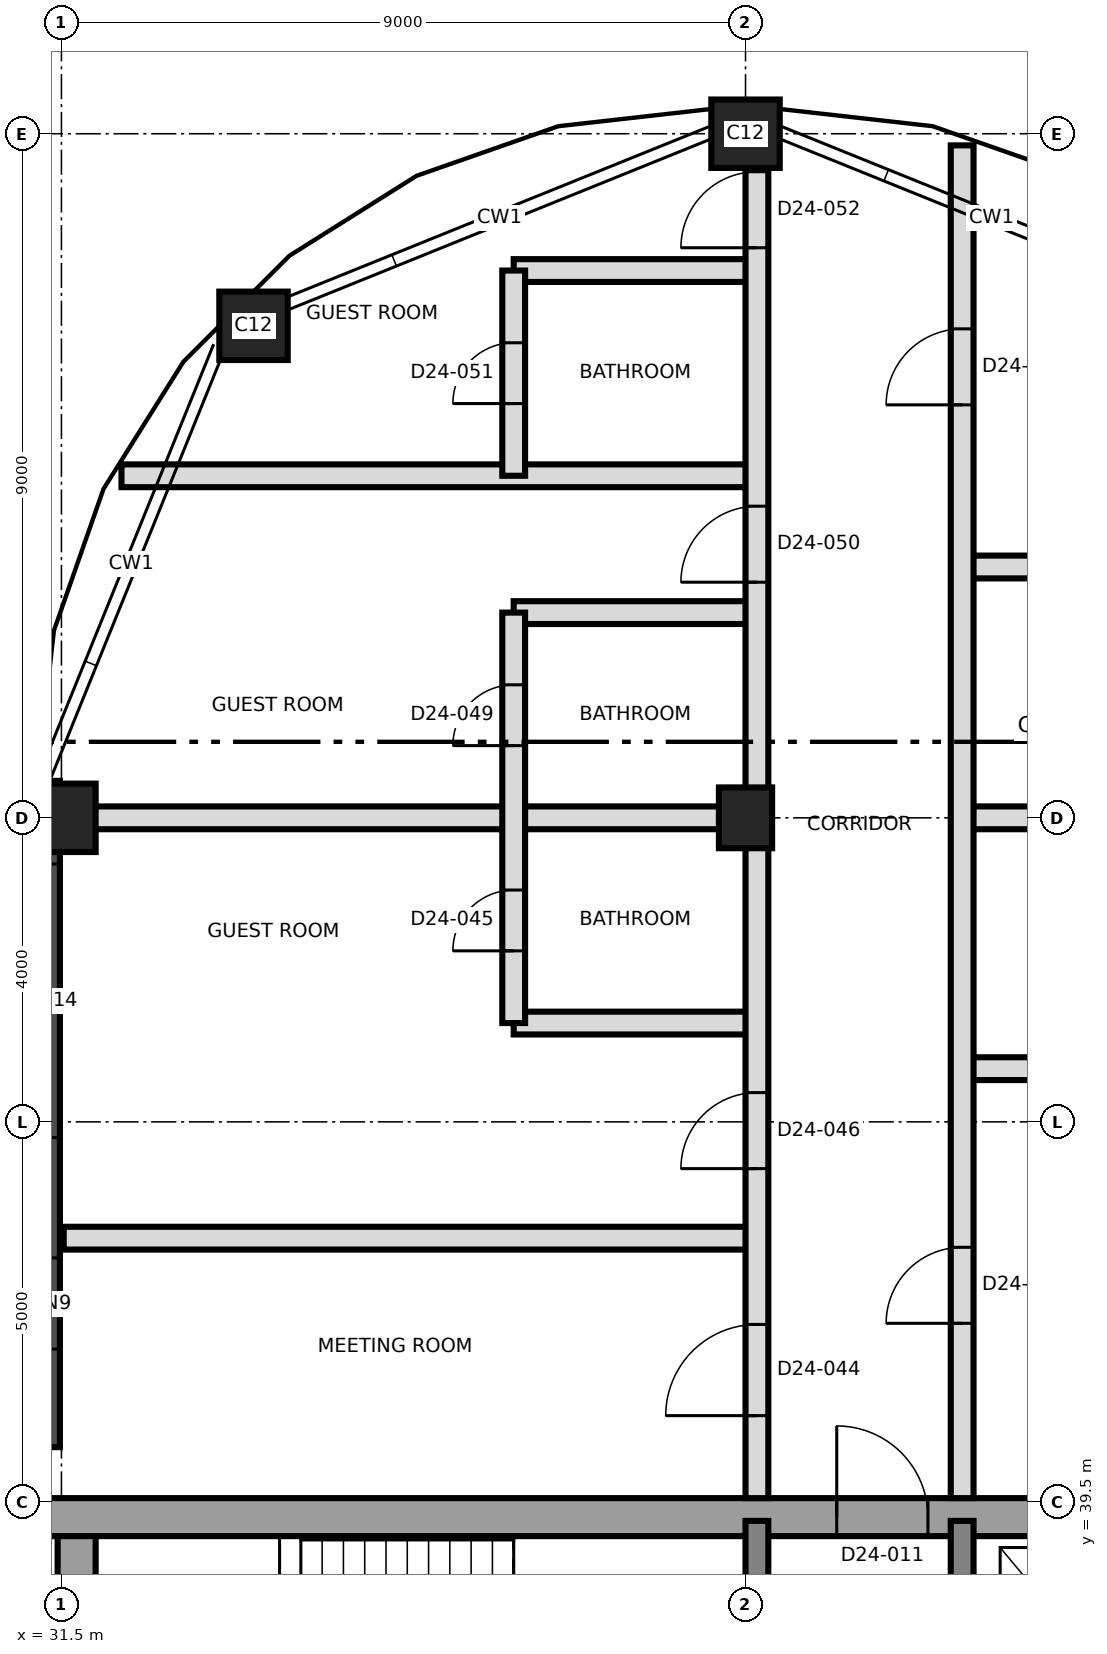
"""IFC4 building model, lengths in metres.
Left out: names, types, materials, properties, quantities, classifications, styles, units other than length and angle.
Written with IfcOpenShell. Run it as: python <this file> out.ifc"""

import sys

from ifc_helpers import new_model, si_unit, direction, frame, frame_2d, origin, origin_2d, place, context, subcontext, project, spatial, rectangle, extrude, element, fill, save


model = new_model("IFC4")
c1 = context("Model", 3, precision=1e-05, world=origin(), true_north=direction((0.0, 1.0)))
c2 = subcontext(c1, "Body", "Model", "MODEL_VIEW")
j1 = project(units=[si_unit("LENGTHUNIT", "METRE"), si_unit("PLANEANGLEUNIT", "RADIAN")], contexts=[c1])
p1 = place(None, origin())
s1 = spatial("IfcSite", under=j1, at=p1, CompositionType="ELEMENT")
p2 = place(p1, origin())
s2 = spatial("IfcBuilding", under=s1, at=p2, CompositionType="ELEMENT")
p3 = place(p2, frame((0.0, 0.0, 221.7)))
s3 = spatial("IfcBuildingStorey", under=s2, at=p3, CompositionType="ELEMENT", Elevation=221.7)
p4 = place(p3, frame((31.7, 21.75, 0.0), z_axis=(0.0, 0.0, 1.0), x_axis=(0.0, 1.0, 0.0)))
e1 = element("IfcWall", 1, at=p4, inside=s3, PredefinedType="SHEAR", context=c2, shape_type="SweptSolid", body=[
    extrude(rectangle(XDim=17.5, YDim=0.5, at=frame_2d((8.75, 0.0))), origin(), (0.0, 0.0, 1.0), 3.7),
])
p5 = place(p3, frame((31.25, 39.3, 0.0), z_axis=(0.0, 0.0, 1.0), x_axis=(1.0, 0.0, 0.0)))
e2 = element("IfcWall", 2, at=p5, inside=s3, PredefinedType="SHEAR", context=c2, shape_type="SweptSolid", body=[
    extrude(rectangle(XDim=27.0, YDim=0.5, at=frame_2d((13.5, 0.0))), origin(), (0.0, 0.0, 1.0), 3.7),
])
p6 = place(p5, frame((10.45, 0.0, 0.0)))
e3 = element("IfcOpeningElement", 3, at=p6, cuts=e2, PredefinedType="OPENING", context=c2, shape_type="SweptSolid", body=[
    extrude(rectangle(XDim=1.2, YDim=2.1, at=frame_2d((0.6, 1.05))), frame((0.0, 0.26, 0.0), z_axis=(0.0, -1.0, 0.0), x_axis=(1.0, 0.0, 0.0)), (0.0, 0.0, 1.0), 0.52),
])
for number, where, z_axis, x_axis in (
    (4, (40.65, 33.5, 0.0), (0.0, 0.0, 1.0), (0.0, 1.0, 0.0)),
    (5, (43.35, 33.5, 0.0), (0.0, 0.0, 1.0), (0.0, 1.0, 0.0)),
):
    element("IfcWall", number, at=place(p3, frame(where, z_axis=z_axis, x_axis=x_axis)), inside=s3, PredefinedType="SHEAR", context=c2, shape_type="SweptSolid", body=[
        extrude(rectangle(XDim=5.75, YDim=0.3, at=frame_2d((2.875, 0.0))), origin(), (0.0, 0.0, 1.0), 3.7),
    ])
p7 = place(p3, frame((31.5, 48.5, 0.0), z_axis=(0.0, 0.0, 1.0), x_axis=(1.0, 0.0, 0.0)))
e6 = element("IfcColumn", 6, at=p7, inside=s3, PredefinedType="COLUMN", context=c2, shape_type="SweptSolid", body=[
    extrude(rectangle(XDim=0.9, YDim=0.9, at=origin_2d()), origin(), (0.0, 0.0, 1.0), 3.7),
])
p8 = place(p3, frame((40.5, 48.5, 0.0), z_axis=(0.0, 0.0, 1.0), x_axis=(0.0, 1.0, 0.0)))
e7 = element("IfcColumn", 7, at=p8, inside=s3, PredefinedType="COLUMN", context=c2, shape_type="SweptSolid", body=[
    extrude(rectangle(XDim=0.8, YDim=0.7, at=origin_2d()), origin(), (0.0, 0.0, 1.0), 3.7),
])
for number, where, z_axis, x_axis in (
    (8, (34.027, 54.973, 0.0), (0.0, 0.0, 1.0), (1.0, 0.0, 0.0)),
    (9, (40.5, 57.5, 0.0), (0.0, 0.0, 1.0), (1.0, 0.0, 0.0)),
):
    element("IfcColumn", number, at=place(p3, frame(where, z_axis=z_axis, x_axis=x_axis)), inside=s3, PredefinedType="COLUMN", context=c2, shape_type="SweptSolid", body=[
        extrude(rectangle(XDim=0.9, YDim=0.9, at=origin_2d()), origin(), (0.0, 0.0, 1.0), 3.7),
    ])
p9 = place(p3, frame((31.33, 48.986, 0.0), z_axis=(0.0, 0.0, 1.0), x_axis=(0.0, -1.0, 0.0)))
e10 = element("IfcWall", 10, at=p9, inside=s3, PredefinedType="SOLIDWALL", context=c2, shape_type="SweptSolid", body=[
    extrude(rectangle(XDim=8.766, YDim=0.3, at=frame_2d((4.383, 0.0))), origin(), (0.0, 0.0, 1.0), 3.4),
])
p10 = place(p9, frame((1.093, 0.0, 0.9)))
e11 = element("IfcOpeningElement", 11, at=p10, cuts=e10, PredefinedType="OPENING", context=c2, shape_type="SweptSolid", body=[
    extrude(rectangle(XDim=3.6, YDim=1.7, at=frame_2d((1.8, 0.85))), frame((0.0, 0.16, 0.0), z_axis=(0.0, -1.0, 0.0), x_axis=(1.0, 0.0, 0.0)), (0.0, 0.0, 1.0), 0.32),
])
p11 = place(p9, frame((6.276, 0.0, 0.9)))
e12 = element("IfcOpeningElement", 12, at=p11, cuts=e10, PredefinedType="OPENING", context=c2, shape_type="SweptSolid", body=[
    extrude(rectangle(XDim=1.2, YDim=1.5, at=frame_2d((0.6, 0.75))), frame((0.0, 0.16, 0.0), z_axis=(0.0, -1.0, 0.0), x_axis=(1.0, 0.0, 0.0)), (0.0, 0.0, 1.0), 0.32),
])
p12 = place(p3, frame((31.53, 42.97, 0.0), z_axis=(0.0, 0.0, 1.0), x_axis=(1.0, 0.0, 0.0)))
e13 = element("IfcWall", 13, at=p12, inside=s3, PredefinedType="PARTITIONING", context=c2, shape_type="SweptSolid", body=[
    extrude(rectangle(XDim=9.12, YDim=0.3, at=frame_2d((4.56, 0.0))), origin(), (0.0, 0.0, 1.0), 3.4),
])
p13 = place(p3, frame((43.35, 45.2, 0.0), z_axis=(0.0, 0.0, 1.0), x_axis=(1.0, 0.0, 0.0)))
e14 = element("IfcWall", 14, at=p13, inside=s3, PredefinedType="PARTITIONING", context=c2, shape_type="SweptSolid", body=[
    extrude(rectangle(XDim=3.5, YDim=0.3, at=frame_2d((1.75, 0.0))), origin(), (0.0, 0.0, 1.0), 3.4),
])
p14 = place(p3, frame((37.45, 45.8, 0.0), z_axis=(0.0, 0.0, 1.0), x_axis=(1.0, 0.0, 0.0)))
e15 = element("IfcWall", 15, at=p14, inside=s3, PredefinedType="PARTITIONING", context=c2, shape_type="SweptSolid", body=[
    extrude(rectangle(XDim=3.2, YDim=0.3, at=frame_2d((1.6, 0.0))), origin(), (0.0, 0.0, 1.0), 3.4),
])
p15 = place(p3, frame((31.53, 48.5, 0.0), z_axis=(0.0, 0.0, 1.0), x_axis=(1.0, 0.0, 0.0)))
e16 = element("IfcWall", 16, at=p15, inside=s3, PredefinedType="PARTITIONING", context=c2, shape_type="SweptSolid", body=[
    extrude(rectangle(XDim=9.12, YDim=0.3, at=frame_2d((4.56, 0.0))), origin(), (0.0, 0.0, 1.0), 3.4),
])
p16 = place(p3, frame((43.35, 48.5, 0.0), z_axis=(0.0, 0.0, 1.0), x_axis=(1.0, 0.0, 0.0)))
e17 = element("IfcWall", 17, at=p16, inside=s3, PredefinedType="PARTITIONING", context=c2, shape_type="SweptSolid", body=[
    extrude(rectangle(XDim=6.12, YDim=0.3, at=frame_2d((3.06, 0.0))), origin(), (0.0, 0.0, 1.0), 3.4),
])
p17 = place(p3, frame((37.45, 51.2, 0.0), z_axis=(0.0, 0.0, 1.0), x_axis=(1.0, 0.0, 0.0)))
e18 = element("IfcWall", 18, at=p17, inside=s3, PredefinedType="PARTITIONING", context=c2, shape_type="SweptSolid", body=[
    extrude(rectangle(XDim=3.2, YDim=0.3, at=frame_2d((1.6, 0.0))), origin(), (0.0, 0.0, 1.0), 3.4),
])
p18 = place(p3, frame((43.35, 51.8, 0.0), z_axis=(0.0, 0.0, 1.0), x_axis=(1.0, 0.0, 0.0)))
e19 = element("IfcWall", 19, at=p18, inside=s3, PredefinedType="PARTITIONING", context=c2, shape_type="SweptSolid", body=[
    extrude(rectangle(XDim=3.5, YDim=0.3, at=frame_2d((1.75, 0.0))), origin(), (0.0, 0.0, 1.0), 3.4),
])
p19 = place(p3, frame((32.29, 53.0, 0.0), z_axis=(0.0, 0.0, 1.0), x_axis=(1.0, 0.0, 0.0)))
e20 = element("IfcWall", 20, at=p19, inside=s3, PredefinedType="PARTITIONING", context=c2, shape_type="SweptSolid", body=[
    extrude(rectangle(XDim=8.36, YDim=0.3, at=frame_2d((4.18, 0.0))), origin(), (0.0, 0.0, 1.0), 3.4),
])
p20 = place(p3, frame((37.45, 55.7, 0.0), z_axis=(0.0, 0.0, 1.0), x_axis=(1.0, 0.0, 0.0)))
e21 = element("IfcWall", 21, at=p20, inside=s3, PredefinedType="PARTITIONING", context=c2, shape_type="SweptSolid", body=[
    extrude(rectangle(XDim=3.2, YDim=0.3, at=frame_2d((1.6, 0.0))), origin(), (0.0, 0.0, 1.0), 3.4),
])
p21 = place(p3, frame((37.45, 45.8, 0.0), z_axis=(0.0, 0.0, 1.0), x_axis=(0.0, 1.0, 0.0)))
e22 = element("IfcWall", 22, at=p21, inside=s3, PredefinedType="PARTITIONING", context=c2, shape_type="SweptSolid", body=[
    extrude(rectangle(XDim=5.4, YDim=0.3, at=frame_2d((2.7, 0.0))), origin(), (0.0, 0.0, 1.0), 3.4),
])
p22 = place(p21, frame((0.95, 0.0, 0.0)))
e23 = element("IfcOpeningElement", 23, at=p22, cuts=e22, PredefinedType="OPENING", context=c2, shape_type="SweptSolid", body=[
    extrude(rectangle(XDim=0.8, YDim=2.1, at=frame_2d((0.4, 1.05))), frame((0.0, 0.16, 0.0), z_axis=(0.0, -1.0, 0.0), x_axis=(1.0, 0.0, 0.0)), (0.0, 0.0, 1.0), 0.32),
])
p23 = place(p21, frame((3.65, 0.0, 0.0)))
e24 = element("IfcOpeningElement", 24, at=p23, cuts=e22, PredefinedType="OPENING", context=c2, shape_type="SweptSolid", body=[
    extrude(rectangle(XDim=0.8, YDim=2.1, at=frame_2d((0.4, 1.05))), frame((0.0, 0.16, 0.0), z_axis=(0.0, -1.0, 0.0), x_axis=(1.0, 0.0, 0.0)), (0.0, 0.0, 1.0), 0.32),
])
p24 = place(p3, frame((37.45, 53.0, 0.0), z_axis=(0.0, 0.0, 1.0), x_axis=(0.0, 1.0, 0.0)))
e25 = element("IfcWall", 25, at=p24, inside=s3, PredefinedType="PARTITIONING", context=c2, shape_type="SweptSolid", body=[
    extrude(rectangle(XDim=2.7, YDim=0.3, at=frame_2d((1.35, 0.0))), origin(), (0.0, 0.0, 1.0), 3.4),
])
p25 = place(p24, frame((0.95, 0.0, 0.0)))
e26 = element("IfcOpeningElement", 26, at=p25, cuts=e25, PredefinedType="OPENING", context=c2, shape_type="SweptSolid", body=[
    extrude(rectangle(XDim=0.8, YDim=2.1, at=frame_2d((0.4, 1.05))), frame((0.0, 0.16, 0.0), z_axis=(0.0, -1.0, 0.0), x_axis=(1.0, 0.0, 0.0)), (0.0, 0.0, 1.0), 0.32),
])
p26 = place(p3, frame((40.65, 39.55, 0.0), z_axis=(0.0, 0.0, 1.0), x_axis=(0.0, 1.0, 0.0)))
e27 = element("IfcWall", 27, at=p26, inside=s3, PredefinedType="PARTITIONING", context=c2, shape_type="SweptSolid", body=[
    extrude(rectangle(XDim=17.92, YDim=0.3, at=frame_2d((8.96, 0.0))), origin(), (0.0, 0.0, 1.0), 3.4),
])
p27 = place(p26, frame((1.085, 0.0, 0.0)))
e28 = element("IfcOpeningElement", 28, at=p27, cuts=e27, PredefinedType="OPENING", context=c2, shape_type="SweptSolid", body=[
    extrude(rectangle(XDim=1.2, YDim=2.1, at=frame_2d((0.6, 1.05))), frame((0.0, 0.16, 0.0), z_axis=(0.0, -1.0, 0.0), x_axis=(1.0, 0.0, 0.0)), (0.0, 0.0, 1.0), 0.32),
])
p28 = place(p26, frame((4.335, 0.0, 0.0)))
e29 = element("IfcOpeningElement", 29, at=p28, cuts=e27, PredefinedType="OPENING", context=c2, shape_type="SweptSolid", body=[
    extrude(rectangle(XDim=1.0, YDim=2.1, at=frame_2d((0.5, 1.05))), frame((0.0, 0.16, 0.0), z_axis=(0.0, -1.0, 0.0), x_axis=(1.0, 0.0, 0.0)), (0.0, 0.0, 1.0), 0.32),
])
p29 = place(p26, frame((12.05, 0.0, 0.0)))
e30 = element("IfcOpeningElement", 30, at=p29, cuts=e27, PredefinedType="OPENING", context=c2, shape_type="SweptSolid", body=[
    extrude(rectangle(XDim=1.0, YDim=2.1, at=frame_2d((0.5, 1.05))), frame((0.0, 0.16, 0.0), z_axis=(0.0, -1.0, 0.0), x_axis=(1.0, 0.0, 0.0)), (0.0, 0.0, 1.0), 0.32),
])
p30 = place(p26, frame((16.45, 0.0, 0.0)))
e31 = element("IfcOpeningElement", 31, at=p30, cuts=e27, PredefinedType="OPENING", context=c2, shape_type="SweptSolid", body=[
    extrude(rectangle(XDim=1.0, YDim=2.1, at=frame_2d((0.5, 1.05))), frame((0.0, 0.16, 0.0), z_axis=(0.0, -1.0, 0.0), x_axis=(1.0, 0.0, 0.0)), (0.0, 0.0, 1.0), 0.32),
])
p31 = place(p3, frame((43.35, 39.55, 0.0), z_axis=(0.0, 0.0, 1.0), x_axis=(0.0, 1.0, 0.0)))
e32 = element("IfcWall", 32, at=p31, inside=s3, PredefinedType="PARTITIONING", context=c2, shape_type="SweptSolid", body=[
    extrude(rectangle(XDim=17.797, YDim=0.3, at=frame_2d((8.898, 0.0))), origin(), (0.0, 0.0, 1.0), 3.4),
])
p32 = place(p31, frame((2.3, 0.0, 0.0)))
e33 = element("IfcOpeningElement", 33, at=p32, cuts=e32, PredefinedType="OPENING", context=c2, shape_type="SweptSolid", body=[
    extrude(rectangle(XDim=1.0, YDim=2.4, at=frame_2d((0.5, 1.2))), frame((0.0, 0.16, 0.0), z_axis=(0.0, -1.0, 0.0), x_axis=(1.0, 0.0, 0.0)), (0.0, 0.0, 1.0), 0.32),
])
p33 = place(p31, frame((14.383, 0.0, 0.0)))
e34 = element("IfcOpeningElement", 34, at=p33, cuts=e32, PredefinedType="OPENING", context=c2, shape_type="SweptSolid", body=[
    extrude(rectangle(XDim=1.0, YDim=2.4, at=frame_2d((0.5, 1.2))), frame((0.0, 0.16, 0.0), z_axis=(0.0, -1.0, 0.0), x_axis=(1.0, 0.0, 0.0)), (0.0, 0.0, 1.0), 0.32),
])
p34 = place(p6, origin())
e35 = element("IfcDoor", 35, at=p34, inside=s3, OperationType="SINGLE_SWING_RIGHT", PredefinedType="DOOR", context=c2, shape_type="SweptSolid", body=[
    extrude(rectangle(XDim=1.2, YDim=2.1, at=frame_2d((0.6, 1.05))), frame((0.0, 0.025, 0.0), z_axis=(0.0, -1.0, 0.0), x_axis=(1.0, 0.0, 0.0)), (0.0, 0.0, 1.0), 0.05),
])
fill(e3, e35)
p35 = place(p32, origin())
e36 = element("IfcDoor", 36, at=p35, inside=s3, OperationType="SINGLE_SWING_RIGHT", PredefinedType="DOOR", context=c2, shape_type="SweptSolid", body=[
    extrude(rectangle(XDim=1.0, YDim=2.4, at=frame_2d((0.5, 1.2))), frame((0.0, 0.025, 0.0), z_axis=(0.0, -1.0, 0.0), x_axis=(1.0, 0.0, 0.0)), (0.0, 0.0, 1.0), 0.05),
])
fill(e33, e36)
p36 = place(p27, origin())
e37 = element("IfcDoor", 37, at=p36, inside=s3, OperationType="SINGLE_SWING_LEFT", PredefinedType="DOOR", context=c2, shape_type="SweptSolid", body=[
    extrude(rectangle(XDim=1.2, YDim=2.1, at=frame_2d((0.6, 1.05))), frame((0.0, 0.025, 0.0), z_axis=(0.0, -1.0, 0.0), x_axis=(1.0, 0.0, 0.0)), (0.0, 0.0, 1.0), 0.05),
])
fill(e28, e37)
p37 = place(p22, origin())
e38 = element("IfcDoor", 38, at=p37, inside=s3, OperationType="SINGLE_SWING_LEFT", PredefinedType="DOOR", context=c2, shape_type="SweptSolid", body=[
    extrude(rectangle(XDim=0.8, YDim=2.1, at=frame_2d((0.4, 1.05))), frame((0.0, 0.025, 0.0), z_axis=(0.0, -1.0, 0.0), x_axis=(1.0, 0.0, 0.0)), (0.0, 0.0, 1.0), 0.05),
])
fill(e23, e38)
p38 = place(p28, origin())
e39 = element("IfcDoor", 39, at=p38, inside=s3, OperationType="SINGLE_SWING_RIGHT", PredefinedType="DOOR", context=c2, shape_type="SweptSolid", body=[
    extrude(rectangle(XDim=1.0, YDim=2.1, at=frame_2d((0.5, 1.05))), frame((0.0, 0.025, 0.0), z_axis=(0.0, -1.0, 0.0), x_axis=(1.0, 0.0, 0.0)), (0.0, 0.0, 1.0), 0.05),
])
fill(e29, e39)
p39 = place(p33, origin())
e40 = element("IfcDoor", 40, at=p39, inside=s3, OperationType="SINGLE_SWING_LEFT", PredefinedType="DOOR", context=c2, shape_type="SweptSolid", body=[
    extrude(rectangle(XDim=1.0, YDim=2.4, at=frame_2d((0.5, 1.2))), frame((0.0, 0.025, 0.0), z_axis=(0.0, -1.0, 0.0), x_axis=(1.0, 0.0, 0.0)), (0.0, 0.0, 1.0), 0.05),
])
fill(e34, e40)
p40 = place(p23, origin())
e41 = element("IfcDoor", 41, at=p40, inside=s3, OperationType="SINGLE_SWING_LEFT", PredefinedType="DOOR", context=c2, shape_type="SweptSolid", body=[
    extrude(rectangle(XDim=0.8, YDim=2.1, at=frame_2d((0.4, 1.05))), frame((0.0, 0.025, 0.0), z_axis=(0.0, -1.0, 0.0), x_axis=(1.0, 0.0, 0.0)), (0.0, 0.0, 1.0), 0.05),
])
fill(e24, e41)
p41 = place(p29, origin())
e42 = element("IfcDoor", 42, at=p41, inside=s3, OperationType="SINGLE_SWING_LEFT", PredefinedType="DOOR", context=c2, shape_type="SweptSolid", body=[
    extrude(rectangle(XDim=1.0, YDim=2.1, at=frame_2d((0.5, 1.05))), frame((0.0, 0.025, 0.0), z_axis=(0.0, -1.0, 0.0), x_axis=(1.0, 0.0, 0.0)), (0.0, 0.0, 1.0), 0.05),
])
fill(e30, e42)
p42 = place(p25, origin())
e43 = element("IfcDoor", 43, at=p42, inside=s3, OperationType="SINGLE_SWING_LEFT", PredefinedType="DOOR", context=c2, shape_type="SweptSolid", body=[
    extrude(rectangle(XDim=0.8, YDim=2.1, at=frame_2d((0.4, 1.05))), frame((0.0, 0.025, 0.0), z_axis=(0.0, -1.0, 0.0), x_axis=(1.0, 0.0, 0.0)), (0.0, 0.0, 1.0), 0.05),
])
fill(e26, e43)
p43 = place(p30, origin())
e44 = element("IfcDoor", 44, at=p43, inside=s3, OperationType="SINGLE_SWING_RIGHT", PredefinedType="DOOR", context=c2, shape_type="SweptSolid", body=[
    extrude(rectangle(XDim=1.0, YDim=2.1, at=frame_2d((0.5, 1.05))), frame((0.0, 0.025, 0.0), z_axis=(0.0, -1.0, 0.0), x_axis=(1.0, 0.0, 0.0)), (0.0, 0.0, 1.0), 0.05),
])
fill(e31, e44)
save(model, sys.argv[1])
